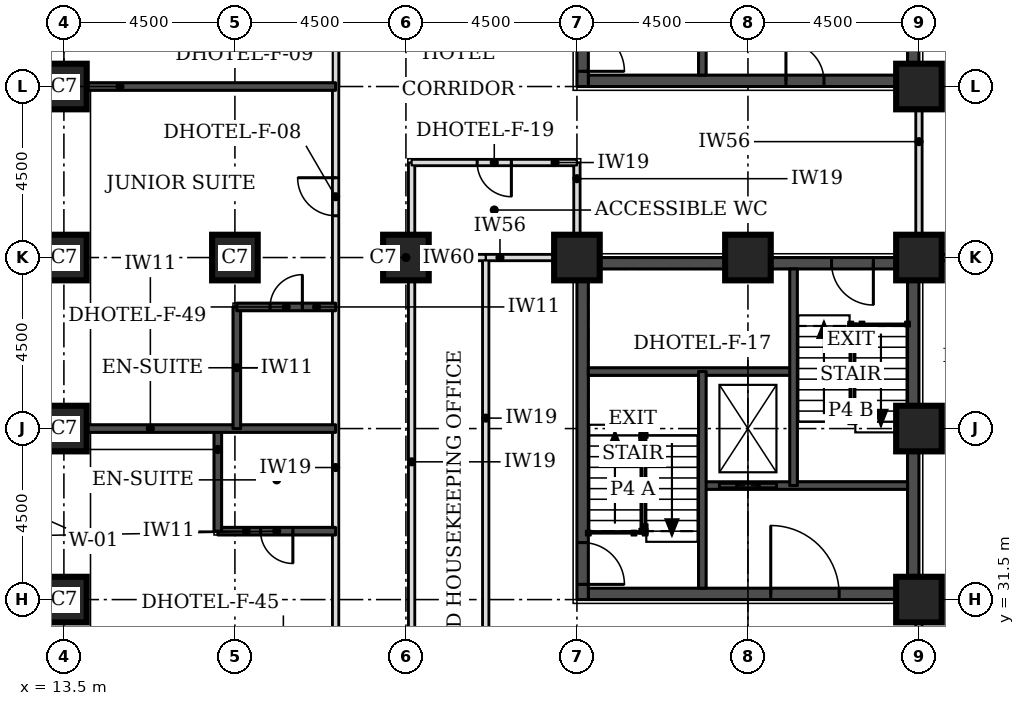
"""IFC4 building model, lengths in metres.
Left out: names, types, materials, properties, quantities, classifications, styles, units other than length and angle.
Written with IfcOpenShell. Run it as: python <this file> out.ifc"""

import sys

from ifc_helpers import new_model, si_unit, direction, frame, frame_2d, origin, origin_2d, place, context, subcontext, project, spatial, rectangle, extrude, element, fill, save


model = new_model("IFC4")
c1 = context("Model", 3, precision=1e-05, world=origin(), true_north=direction((0.0, 1.0)))
c2 = subcontext(c1, "Body", "Model", "MODEL_VIEW")
j1 = project(units=[si_unit("LENGTHUNIT", "METRE"), si_unit("PLANEANGLEUNIT", "RADIAN")], contexts=[c1])
p1 = place(None, origin())
s1 = spatial("IfcSite", under=j1, at=p1, CompositionType="ELEMENT")
p2 = place(p1, origin())
s2 = spatial("IfcBuilding", under=s1, at=p2, CompositionType="ELEMENT")
p3 = place(p2, frame((0.0, 0.0, 42.9)))
s3 = spatial("IfcBuildingStorey", under=s2, at=p3, CompositionType="ELEMENT", Elevation=42.9)
for number, where, z_axis, x_axis in (
    (1, (13.5, 31.5, 0.0), (0.0, 0.0, 1.0), (1.0, 0.0, 0.0)),
    (2, (36.0, 31.5, 0.0), (0.0, 0.0, 1.0), (1.0, 0.0, 0.0)),
    (3, (13.5, 36.0, 0.0), (0.0, 0.0, 1.0), (1.0, 0.0, 0.0)),
    (4, (36.0, 36.0, 0.0), (0.0, 0.0, 1.0), (1.0, 0.0, 0.0)),
    (5, (13.5, 40.5, 0.0), (0.0, 0.0, 1.0), (1.0, 0.0, 0.0)),
    (6, (18.0, 40.5, 0.0), (0.0, 0.0, 1.0), (1.0, 0.0, 0.0)),
    (7, (22.5, 40.5, 0.0), (0.0, 0.0, 1.0), (1.0, 0.0, 0.0)),
    (8, (27.0, 40.5, 0.0), (0.0, 0.0, 1.0), (1.0, 0.0, 0.0)),
    (9, (31.5, 40.5, 0.0), (0.0, 0.0, 1.0), (1.0, 0.0, 0.0)),
    (10, (36.0, 40.5, 0.0), (0.0, 0.0, 1.0), (1.0, 0.0, 0.0)),
    (11, (13.5, 45.0, 0.0), (0.0, 0.0, 1.0), (1.0, 0.0, 0.0)),
    (12, (36.0, 45.0, 0.0), (0.0, 0.0, 1.0), (1.0, 0.0, 0.0)),
):
    element("IfcColumn", number, at=place(p3, frame(where, z_axis=z_axis, x_axis=x_axis)), inside=s3, PredefinedType="COLUMN", context=c2, shape_type="SweptSolid", body=[
        extrude(rectangle(XDim=1.2, YDim=1.2, at=origin_2d()), origin(), (0.0, 0.0, 1.0), 3.3),
    ])
p4 = place(p3, frame((27.3, 45.15, 0.0), z_axis=(0.0, 0.0, 1.0), x_axis=(1.0, 0.0, 0.0)))
e13 = element("IfcWall", 13, at=p4, inside=s3, PredefinedType="SHEAR", context=c2, shape_type="SweptSolid", body=[
    extrude(rectangle(XDim=8.4, YDim=0.3, at=frame_2d((4.2, 0.0))), origin(), (0.0, 0.0, 1.0), 3.3),
])
p5 = place(p4, frame((5.2, 0.0, 0.0)))
e14 = element("IfcOpeningElement", 14, at=p5, cuts=e13, PredefinedType="OPENING", context=c2, shape_type="SweptSolid", body=[
    extrude(rectangle(XDim=1.0, YDim=2.1, at=frame_2d((0.5, 1.05))), frame((0.0, 0.16, 0.0), z_axis=(0.0, -1.0, 0.0), x_axis=(1.0, 0.0, 0.0)), (0.0, 0.0, 1.0), 0.32),
])
p6 = place(p3, frame((27.15, 45.0, 0.0), z_axis=(0.0, 0.0, 1.0), x_axis=(0.0, 1.0, 0.0)))
e15 = element("IfcWall", 15, at=p6, inside=s3, PredefinedType="SHEAR", context=c2, shape_type="SweptSolid", body=[
    extrude(rectangle(XDim=9.0, YDim=0.3, at=frame_2d((4.5, 0.0))), origin(), (0.0, 0.0, 1.0), 3.3),
])
p7 = place(p6, frame((0.4, 0.0, 0.0)))
e16 = element("IfcOpeningElement", 16, at=p7, cuts=e15, PredefinedType="OPENING", context=c2, shape_type="SweptSolid", body=[
    extrude(rectangle(XDim=1.1, YDim=2.1, at=frame_2d((0.55, 1.05))), frame((0.0, 0.16, 0.0), z_axis=(0.0, -1.0, 0.0), x_axis=(1.0, 0.0, 0.0)), (0.0, 0.0, 1.0), 0.32),
])
p8 = place(p3, frame((35.85, 45.0, 0.0), z_axis=(0.0, 0.0, 1.0), x_axis=(0.0, 1.0, 0.0)))
e17 = element("IfcWall", 17, at=p8, inside=s3, PredefinedType="SHEAR", context=c2, shape_type="SweptSolid", body=[
    extrude(rectangle(XDim=9.0, YDim=0.3, at=frame_2d((4.5, 0.0))), origin(), (0.0, 0.0, 1.0), 3.3),
])
p9 = place(p3, frame((27.3, 31.65, 0.0), z_axis=(0.0, 0.0, 1.0), x_axis=(1.0, 0.0, 0.0)))
e18 = element("IfcWall", 18, at=p9, inside=s3, PredefinedType="SHEAR", context=c2, shape_type="SweptSolid", body=[
    extrude(rectangle(XDim=8.4, YDim=0.3, at=frame_2d((4.2, 0.0))), origin(), (0.0, 0.0, 1.0), 3.3),
])
p10 = place(p9, frame((4.8, 0.0, 0.0)))
e19 = element("IfcOpeningElement", 19, at=p10, cuts=e18, PredefinedType="OPENING", context=c2, shape_type="SweptSolid", body=[
    extrude(rectangle(XDim=1.8, YDim=2.1, at=frame_2d((0.9, 1.05))), frame((0.0, 0.16, 0.0), z_axis=(0.0, -1.0, 0.0), x_axis=(1.0, 0.0, 0.0)), (0.0, 0.0, 1.0), 0.32),
])
p11 = place(p3, frame((27.3, 40.35, 0.0), z_axis=(0.0, 0.0, 1.0), x_axis=(1.0, 0.0, 0.0)))
e20 = element("IfcWall", 20, at=p11, inside=s3, PredefinedType="SHEAR", context=c2, shape_type="SweptSolid", body=[
    extrude(rectangle(XDim=8.4, YDim=0.3, at=frame_2d((4.2, 0.0))), origin(), (0.0, 0.0, 1.0), 3.3),
])
p12 = place(p11, frame((6.4, 0.0, 0.0)))
e21 = element("IfcOpeningElement", 21, at=p12, cuts=e20, PredefinedType="OPENING", context=c2, shape_type="SweptSolid", body=[
    extrude(rectangle(XDim=1.1, YDim=2.1, at=frame_2d((0.55, 1.05))), frame((0.0, 0.16, 0.0), z_axis=(0.0, -1.0, 0.0), x_axis=(1.0, 0.0, 0.0)), (0.0, 0.0, 1.0), 0.32),
])
p13 = place(p3, frame((27.15, 31.5, 0.0), z_axis=(0.0, 0.0, 1.0), x_axis=(0.0, 1.0, 0.0)))
e22 = element("IfcWall", 22, at=p13, inside=s3, PredefinedType="SHEAR", context=c2, shape_type="SweptSolid", body=[
    extrude(rectangle(XDim=9.0, YDim=0.3, at=frame_2d((4.5, 0.0))), origin(), (0.0, 0.0, 1.0), 3.3),
])
p14 = place(p13, frame((0.4, 0.0, 0.0)))
e23 = element("IfcOpeningElement", 23, at=p14, cuts=e22, PredefinedType="OPENING", context=c2, shape_type="SweptSolid", body=[
    extrude(rectangle(XDim=1.1, YDim=2.1, at=frame_2d((0.55, 1.05))), frame((0.0, 0.16, 0.0), z_axis=(0.0, -1.0, 0.0), x_axis=(1.0, 0.0, 0.0)), (0.0, 0.0, 1.0), 0.32),
])
p15 = place(p3, frame((35.85, 31.5, 0.0), z_axis=(0.0, 0.0, 1.0), x_axis=(0.0, 1.0, 0.0)))
e24 = element("IfcWall", 24, at=p15, inside=s3, PredefinedType="SHEAR", context=c2, shape_type="SweptSolid", body=[
    extrude(rectangle(XDim=9.0, YDim=0.3, at=frame_2d((4.5, 0.0))), origin(), (0.0, 0.0, 1.0), 3.3),
])
p16 = place(p3, frame((20.65, 23.65, 0.0), z_axis=(0.0, 0.0, 1.0), x_axis=(0.0, 1.0, 0.0)))
e25 = element("IfcWall", 25, at=p16, inside=s3, PredefinedType="PARTITIONING", context=c2, shape_type="SweptSolid", body=[
    extrude(rectangle(XDim=25.85, YDim=0.15, at=frame_2d((12.925, 0.0))), origin(), (0.0, 0.0, 1.0), 3.08),
])
p17 = place(p16, frame((1.9, 0.0, 0.0)))
e26 = element("IfcOpeningElement", 26, at=p17, cuts=e25, PredefinedType="OPENING", context=c2, shape_type="SweptSolid", body=[
    extrude(rectangle(XDim=1.0, YDim=2.1, at=frame_2d((0.5, 1.05))), frame((0.0, 0.085, 0.0), z_axis=(0.0, -1.0, 0.0), x_axis=(1.0, 0.0, 0.0)), (0.0, 0.0, 1.0), 0.17),
])
p18 = place(p16, frame((6.0, 0.0, 0.0)))
e27 = element("IfcOpeningElement", 27, at=p18, cuts=e25, PredefinedType="OPENING", context=c2, shape_type="SweptSolid", body=[
    extrude(rectangle(XDim=1.0, YDim=2.1, at=frame_2d((0.5, 1.05))), frame((0.0, 0.085, 0.0), z_axis=(0.0, -1.0, 0.0), x_axis=(1.0, 0.0, 0.0)), (0.0, 0.0, 1.0), 0.17),
])
p19 = place(p16, frame((17.95, 0.0, 0.0)))
e28 = element("IfcOpeningElement", 28, at=p19, cuts=e25, PredefinedType="OPENING", context=c2, shape_type="SweptSolid", body=[
    extrude(rectangle(XDim=1.0, YDim=2.1, at=frame_2d((0.5, 1.05))), frame((0.0, 0.085, 0.0), z_axis=(0.0, -1.0, 0.0), x_axis=(1.0, 0.0, 0.0)), (0.0, 0.0, 1.0), 0.17),
])
p20 = place(p16, frame((23.04, 0.0, 0.0)))
e29 = element("IfcOpeningElement", 29, at=p20, cuts=e25, PredefinedType="OPENING", context=c2, shape_type="SweptSolid", body=[
    extrude(rectangle(XDim=0.9, YDim=2.1, at=frame_2d((0.45, 1.05))), frame((0.0, 0.085, 0.0), z_axis=(0.0, -1.0, 0.0), x_axis=(1.0, 0.0, 0.0)), (0.0, 0.0, 1.0), 0.17),
])
p21 = place(p3, frame((22.65, 25.65, 0.0), z_axis=(0.0, 0.0, 1.0), x_axis=(0.0, 1.0, 0.0)))
e30 = element("IfcWall", 30, at=p21, inside=s3, PredefinedType="PARTITIONING", context=c2, shape_type="SweptSolid", body=[
    extrude(rectangle(XDim=17.35, YDim=0.15, at=frame_2d((8.675, 0.0))), origin(), (0.0, 0.0, 1.0), 3.08),
])
p22 = place(p21, frame((3.3, 0.0, 0.0)))
e31 = element("IfcOpeningElement", 31, at=p22, cuts=e30, PredefinedType="OPENING", context=c2, shape_type="SweptSolid", body=[
    extrude(rectangle(XDim=0.9, YDim=2.1, at=frame_2d((0.45, 1.05))), frame((0.0, 0.085, 0.0), z_axis=(0.0, -1.0, 0.0), x_axis=(1.0, 0.0, 0.0)), (0.0, 0.0, 1.0), 0.17),
])
p23 = place(p3, frame((24.6, 25.65, 0.0), z_axis=(0.0, 0.0, 1.0), x_axis=(0.0, 1.0, 0.0)))
e32 = element("IfcWall", 32, at=p23, inside=s3, PredefinedType="PARTITIONING", context=c2, shape_type="SweptSolid", body=[
    extrude(rectangle(XDim=14.85, YDim=0.15, at=frame_2d((7.425, 0.0))), origin(), (0.0, 0.0, 1.0), 3.08),
])
p24 = place(p3, frame((36.0, 29.5, 0.0), z_axis=(0.0, 0.0, 1.0), x_axis=(0.0, 1.0, 0.0)))
e33 = element("IfcWall", 33, at=p24, inside=s3, PredefinedType="PARTITIONING", context=c2, shape_type="SweptSolid", body=[
    extrude(rectangle(XDim=1.95, YDim=0.15, at=frame_2d((0.975, 0.0))), origin(), (0.0, 0.0, 1.0), 2.33),
])
p25 = place(p3, frame((24.6, 40.5, 0.0), z_axis=(0.0, 0.0, 1.0), x_axis=(1.0, 0.0, 0.0)))
e34 = element("IfcWall", 34, at=p25, inside=s3, PredefinedType="PARTITIONING", context=c2, shape_type="SweptSolid", body=[
    extrude(rectangle(XDim=2.35, YDim=0.15, at=frame_2d((1.175, 0.0))), origin(), (0.0, 0.0, 1.0), 2.33),
])
p26 = place(p3, frame((27.0, 40.55, 0.0), z_axis=(0.0, 0.0, 1.0), x_axis=(0.0, 1.0, 0.0)))
e35 = element("IfcWall", 35, at=p26, inside=s3, PredefinedType="PARTITIONING", context=c2, shape_type="SweptSolid", body=[
    extrude(rectangle(XDim=2.45, YDim=0.15, at=frame_2d((1.225, 0.0))), origin(), (0.0, 0.0, 1.0), 3.08),
])
p27 = place(p3, frame((36.0, 40.55, 0.0), z_axis=(0.0, 0.0, 1.0), x_axis=(0.0, 1.0, 0.0)))
e36 = element("IfcWall", 36, at=p27, inside=s3, PredefinedType="PARTITIONING", context=c2, shape_type="SweptSolid", body=[
    extrude(rectangle(XDim=4.4, YDim=0.15, at=frame_2d((2.2, 0.0))), origin(), (0.0, 0.0, 1.0), 2.33),
])
p28 = place(p3, frame((22.65, 43.0, 0.0), z_axis=(0.0, 0.0, 1.0), x_axis=(1.0, 0.0, 0.0)))
e37 = element("IfcWall", 37, at=p28, inside=s3, PredefinedType="PARTITIONING", context=c2, shape_type="SweptSolid", body=[
    extrude(rectangle(XDim=4.35, YDim=0.15, at=frame_2d((2.175, 0.0))), origin(), (0.0, 0.0, 1.0), 3.08),
])
p29 = place(p28, frame((1.725, 0.0, 0.0)))
e38 = element("IfcOpeningElement", 38, at=p29, cuts=e37, PredefinedType="OPENING", context=c2, shape_type="SweptSolid", body=[
    extrude(rectangle(XDim=0.9, YDim=2.1, at=frame_2d((0.45, 1.05))), frame((0.0, 0.085, 0.0), z_axis=(0.0, -1.0, 0.0), x_axis=(1.0, 0.0, 0.0)), (0.0, 0.0, 1.0), 0.17),
])
p30 = place(p3, frame((17.55, 33.3, 0.0), z_axis=(0.0, 0.0, 1.0), x_axis=(1.0, 0.0, 0.0)))
e39 = element("IfcWall", 39, at=p30, inside=s3, PredefinedType="SOLIDWALL", context=c2, shape_type="SweptSolid", body=[
    extrude(rectangle(XDim=3.1, YDim=0.2, at=frame_2d((1.55, 0.0))), origin(), (0.0, 0.0, 1.0), 3.08),
])
p31 = place(p30, frame((1.125, 0.0, 0.0)))
e40 = element("IfcOpeningElement", 40, at=p31, cuts=e39, PredefinedType="OPENING", context=c2, shape_type="SweptSolid", body=[
    extrude(rectangle(XDim=0.85, YDim=2.1, at=frame_2d((0.425, 1.05))), frame((0.0, 0.11, 0.0), z_axis=(0.0, -1.0, 0.0), x_axis=(1.0, 0.0, 0.0)), (0.0, 0.0, 1.0), 0.22),
])
p32 = place(p3, frame((17.55, 33.3, 0.0), z_axis=(0.0, 0.0, 1.0), x_axis=(0.0, 1.0, 0.0)))
e41 = element("IfcWall", 41, at=p32, inside=s3, PredefinedType="SOLIDWALL", context=c2, shape_type="SweptSolid", body=[
    extrude(rectangle(XDim=2.7, YDim=0.2, at=frame_2d((1.35, 0.0))), origin(), (0.0, 0.0, 1.0), 3.08),
])
p33 = place(p3, frame((14.1, 36.0, 0.0), z_axis=(0.0, 0.0, 1.0), x_axis=(1.0, 0.0, 0.0)))
e42 = element("IfcWall", 42, at=p33, inside=s3, PredefinedType="SOLIDWALL", context=c2, shape_type="SweptSolid", body=[
    extrude(rectangle(XDim=6.55, YDim=0.2, at=frame_2d((3.275, 0.0))), origin(), (0.0, 0.0, 1.0), 3.08),
])
p34 = place(p3, frame((18.05, 36.0, 0.0), z_axis=(0.0, 0.0, 1.0), x_axis=(0.0, 1.0, 0.0)))
e43 = element("IfcWall", 43, at=p34, inside=s3, PredefinedType="SOLIDWALL", context=c2, shape_type="SweptSolid", body=[
    extrude(rectangle(XDim=3.2, YDim=0.2, at=frame_2d((1.6, 0.0))), origin(), (0.0, 0.0, 1.0), 3.08),
])
p35 = place(p3, frame((18.05, 39.2, 0.0), z_axis=(0.0, 0.0, 1.0), x_axis=(1.0, 0.0, 0.0)))
e44 = element("IfcWall", 44, at=p35, inside=s3, PredefinedType="SOLIDWALL", context=c2, shape_type="SweptSolid", body=[
    extrude(rectangle(XDim=2.6, YDim=0.2, at=frame_2d((1.3, 0.0))), origin(), (0.0, 0.0, 1.0), 3.08),
])
p36 = place(p35, frame((0.875, 0.0, 0.0)))
e45 = element("IfcOpeningElement", 45, at=p36, cuts=e44, PredefinedType="OPENING", context=c2, shape_type="SweptSolid", body=[
    extrude(rectangle(XDim=0.85, YDim=2.1, at=frame_2d((0.425, 1.05))), frame((0.0, 0.11, 0.0), z_axis=(0.0, -1.0, 0.0), x_axis=(1.0, 0.0, 0.0)), (0.0, 0.0, 1.0), 0.22),
])
p37 = place(p3, frame((14.1, 45.0, 0.0), z_axis=(0.0, 0.0, 1.0), x_axis=(1.0, 0.0, 0.0)))
e46 = element("IfcWall", 46, at=p37, inside=s3, PredefinedType="SOLIDWALL", context=c2, shape_type="SweptSolid", body=[
    extrude(rectangle(XDim=6.55, YDim=0.2, at=frame_2d((3.275, 0.0))), origin(), (0.0, 0.0, 1.0), 3.08),
])
p38 = place(p3, frame((22.65, 40.5, 0.0), z_axis=(0.0, 0.0, 1.0), x_axis=(1.0, 0.0, 0.0)))
e47 = element("IfcWall", 47, at=p38, inside=s3, PredefinedType="PARTITIONING", context=c2, shape_type="SweptSolid", body=[
    extrude(rectangle(XDim=1.95, YDim=0.15, at=frame_2d((0.975, 0.0))), origin(), (0.0, 0.0, 1.0), 2.33),
])
p39 = place(p3, frame((36.05, 40.5, 0.0), z_axis=(0.0, 0.0, 1.0), x_axis=(1.0, 0.0, 0.0)))
e48 = element("IfcWall", 48, at=p39, inside=s3, PredefinedType="PARTITIONING", context=c2, shape_type="SweptSolid", body=[
    extrude(rectangle(XDim=2.45, YDim=0.15, at=frame_2d((1.225, 0.0))), origin(), (0.0, 0.0, 1.0), 2.33),
])
p40 = place(p3, frame((30.3, 45.3, 0.0), z_axis=(0.0, 0.0, 1.0), x_axis=(0.0, 1.0, 0.0)))
e49 = element("IfcWall", 49, at=p40, inside=s3, PredefinedType="SOLIDWALL", context=c2, shape_type="SweptSolid", body=[
    extrude(rectangle(XDim=5.7, YDim=0.2, at=frame_2d((2.85, 0.0))), origin(), (0.0, 0.0, 1.0), 3.08),
])
p41 = place(p3, frame((30.3, 34.5, 0.0), z_axis=(0.0, 0.0, 1.0), x_axis=(1.0, 0.0, 0.0)))
e50 = element("IfcWall", 50, at=p41, inside=s3, PredefinedType="SOLIDWALL", context=c2, shape_type="SweptSolid", body=[
    extrude(rectangle(XDim=5.4, YDim=0.2, at=frame_2d((2.7, 0.0))), origin(), (0.0, 0.0, 1.0), 3.08),
])
p42 = place(p41, frame((0.45, 0.0, 0.0)))
e51 = element("IfcOpeningElement", 51, at=p42, cuts=e50, PredefinedType="OPENING", context=c2, shape_type="SweptSolid", body=[
    extrude(rectangle(XDim=1.5, YDim=2.1, at=frame_2d((0.75, 1.05))), frame((0.0, 0.11, 0.0), z_axis=(0.0, -1.0, 0.0), x_axis=(1.0, 0.0, 0.0)), (0.0, 0.0, 1.0), 0.22),
])
p43 = place(p3, frame((27.3, 37.5, 0.0), z_axis=(0.0, 0.0, 1.0), x_axis=(1.0, 0.0, 0.0)))
e52 = element("IfcWall", 52, at=p43, inside=s3, PredefinedType="SOLIDWALL", context=c2, shape_type="SweptSolid", body=[
    extrude(rectangle(XDim=5.4, YDim=0.2, at=frame_2d((2.7, 0.0))), origin(), (0.0, 0.0, 1.0), 3.08),
])
for number, where, z_axis, x_axis in (
    (53, (30.3, 31.8, 0.0), (0.0, 0.0, 1.0), (0.0, 1.0, 0.0)),
    (54, (32.7, 34.5, 0.0), (0.0, 0.0, 1.0), (0.0, 1.0, 0.0)),
):
    element("IfcWall", number, at=place(p3, frame(where, z_axis=z_axis, x_axis=x_axis)), inside=s3, PredefinedType="SOLIDWALL", context=c2, shape_type="SweptSolid", body=[
        extrude(rectangle(XDim=5.7, YDim=0.2, at=frame_2d((2.85, 0.0))), origin(), (0.0, 0.0, 1.0), 3.08),
    ])
p44 = place(p31, frame((0.85, 0.0, 0.0), z_axis=(0.0, 0.0, 1.0), x_axis=(-1.0, 0.0, 0.0)))
e55 = element("IfcDoor", 55, at=p44, inside=s3, OperationType="SINGLE_SWING_LEFT", PredefinedType="DOOR", context=c2, shape_type="SweptSolid", body=[
    extrude(rectangle(XDim=0.85, YDim=2.1, at=frame_2d((0.425, 1.05))), frame((0.0, 0.025, 0.0), z_axis=(0.0, -1.0, 0.0), x_axis=(1.0, 0.0, 0.0)), (0.0, 0.0, 1.0), 0.05),
])
fill(e40, e55)
p45 = place(p19, origin())
e56 = element("IfcDoor", 56, at=p45, inside=s3, OperationType="SINGLE_SWING_RIGHT", PredefinedType="DOOR", context=c2, shape_type="SweptSolid", body=[
    extrude(rectangle(XDim=1.0, YDim=2.1, at=frame_2d((0.5, 1.05))), frame((0.0, 0.025, 0.0), z_axis=(0.0, -1.0, 0.0), x_axis=(1.0, 0.0, 0.0)), (0.0, 0.0, 1.0), 0.05),
])
fill(e28, e56)
p46 = place(p36, origin())
e57 = element("IfcDoor", 57, at=p46, inside=s3, OperationType="SINGLE_SWING_RIGHT", PredefinedType="DOOR", context=c2, shape_type="SweptSolid", body=[
    extrude(rectangle(XDim=0.85, YDim=2.1, at=frame_2d((0.425, 1.05))), frame((0.0, 0.025, 0.0), z_axis=(0.0, -1.0, 0.0), x_axis=(1.0, 0.0, 0.0)), (0.0, 0.0, 1.0), 0.05),
])
fill(e45, e57)
p47 = place(p29, frame((0.9, 0.0, 0.0), z_axis=(0.0, 0.0, 1.0), x_axis=(-1.0, 0.0, 0.0)))
e58 = element("IfcDoor", 58, at=p47, inside=s3, OperationType="SINGLE_SWING_LEFT", PredefinedType="DOOR", context=c2, shape_type="SweptSolid", body=[
    extrude(rectangle(XDim=0.9, YDim=2.1, at=frame_2d((0.45, 1.05))), frame((0.0, 0.025, 0.0), z_axis=(0.0, -1.0, 0.0), x_axis=(1.0, 0.0, 0.0)), (0.0, 0.0, 1.0), 0.05),
])
fill(e38, e58)
p48 = place(p7, frame((1.1, 0.0, 0.0), z_axis=(0.0, 0.0, 1.0), x_axis=(-1.0, 0.0, 0.0)))
e59 = element("IfcDoor", 59, at=p48, inside=s3, OperationType="SINGLE_SWING_RIGHT", PredefinedType="DOOR", context=c2, shape_type="SweptSolid", body=[
    extrude(rectangle(XDim=1.1, YDim=2.1, at=frame_2d((0.55, 1.05))), frame((0.0, 0.025, 0.0), z_axis=(0.0, -1.0, 0.0), x_axis=(1.0, 0.0, 0.0)), (0.0, 0.0, 1.0), 0.05),
])
fill(e16, e59)
p49 = place(p5, origin())
e60 = element("IfcDoor", 60, at=p49, inside=s3, OperationType="SINGLE_SWING_LEFT", PredefinedType="DOOR", context=c2, shape_type="SweptSolid", body=[
    extrude(rectangle(XDim=1.0, YDim=2.1, at=frame_2d((0.5, 1.05))), frame((0.0, 0.025, 0.0), z_axis=(0.0, -1.0, 0.0), x_axis=(1.0, 0.0, 0.0)), (0.0, 0.0, 1.0), 0.05),
])
fill(e14, e60)
p50 = place(p14, frame((1.1, 0.0, 0.0), z_axis=(0.0, 0.0, 1.0), x_axis=(-1.0, 0.0, 0.0)))
e61 = element("IfcDoor", 61, at=p50, inside=s3, OperationType="SINGLE_SWING_RIGHT", PredefinedType="DOOR", context=c2, shape_type="SweptSolid", body=[
    extrude(rectangle(XDim=1.1, YDim=2.1, at=frame_2d((0.55, 1.05))), frame((0.0, 0.025, 0.0), z_axis=(0.0, -1.0, 0.0), x_axis=(1.0, 0.0, 0.0)), (0.0, 0.0, 1.0), 0.05),
])
fill(e23, e61)
p51 = place(p12, frame((1.1, 0.0, 0.0), z_axis=(0.0, 0.0, 1.0), x_axis=(-1.0, 0.0, 0.0)))
e62 = element("IfcDoor", 62, at=p51, inside=s3, OperationType="SINGLE_SWING_LEFT", PredefinedType="DOOR", context=c2, shape_type="SweptSolid", body=[
    extrude(rectangle(XDim=1.1, YDim=2.1, at=frame_2d((0.55, 1.05))), frame((0.0, 0.025, 0.0), z_axis=(0.0, -1.0, 0.0), x_axis=(1.0, 0.0, 0.0)), (0.0, 0.0, 1.0), 0.05),
])
fill(e21, e62)
p52 = place(p42, origin())
e63 = element("IfcDoor", 63, at=p52, inside=s3, OperationType="DOUBLE_DOOR_SLIDING", PredefinedType="DOOR", context=c2, shape_type="SweptSolid", body=[
    extrude(rectangle(XDim=1.5, YDim=2.1, at=frame_2d((0.75, 1.05))), frame((0.0, 0.025, 0.0), z_axis=(0.0, -1.0, 0.0), x_axis=(1.0, 0.0, 0.0)), (0.0, 0.0, 1.0), 0.05),
])
fill(e51, e63)
p53 = place(p10, origin())
e64 = element("IfcDoor", 64, at=p53, inside=s3, OperationType="SINGLE_SWING_LEFT", PredefinedType="DOOR", context=c2, shape_type="SweptSolid", body=[
    extrude(rectangle(XDim=1.8, YDim=2.1, at=frame_2d((0.9, 1.05))), frame((0.0, 0.025, 0.0), z_axis=(0.0, -1.0, 0.0), x_axis=(1.0, 0.0, 0.0)), (0.0, 0.0, 1.0), 0.05),
])
fill(e19, e64)
save(model, sys.argv[1])
